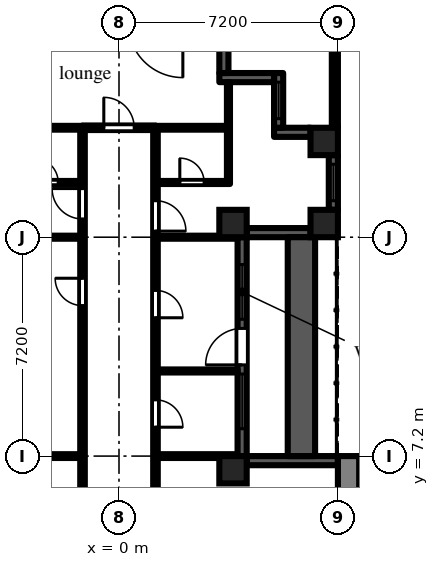
"""IFC4 building model, lengths in metres.
Left out: names, types, materials, properties, quantities, classifications, styles, units other than length and angle.
Written with IfcOpenShell. Run it as: python <this file> out.ifc"""

import sys

from ifc_helpers import new_model, si_unit, direction, frame, frame_2d, origin, origin_2d, place, context, subcontext, project, spatial, rectangle, extrude, element, fill, save


model = new_model("IFC4")
c1 = context("Model", 3, precision=1e-05, world=origin(), true_north=direction((0.0, 1.0)))
c2 = subcontext(c1, "Body", "Model", "MODEL_VIEW")
j1 = project(units=[si_unit("LENGTHUNIT", "METRE"), si_unit("PLANEANGLEUNIT", "RADIAN")], contexts=[c1])
p1 = place(None, origin())
s1 = spatial("IfcSite", under=j1, at=p1, CompositionType="ELEMENT")
p2 = place(p1, origin())
s2 = spatial("IfcBuilding", under=s1, at=p2, CompositionType="ELEMENT")
p3 = place(p2, frame((0.0, 0.0, 66.9)))
s3 = spatial("IfcBuildingStorey", under=s2, at=p3, CompositionType="ELEMENT", Elevation=66.9)
for number, where, z_axis, x_axis in (
    (1, (3.75, 6.75, 0.0), (0.0, 0.0, 1.0), (1.0, 0.0, 0.0)),
    (2, (3.75, 14.85, 0.0), (0.0, 0.0, 1.0), (1.0, 0.0, 0.0)),
    (3, (6.75, 14.85, 0.0), (0.0, 0.0, 1.0), (1.0, 0.0, 0.0)),
    (4, (6.75, 17.55, 0.0), (0.0, 0.0, 1.0), (1.0, 0.0, 0.0)),
):
    element("IfcColumn", number, at=place(p3, frame(where, z_axis=z_axis, x_axis=x_axis)), inside=s3, PredefinedType="COLUMN", context=c2, shape_type="SweptSolid", body=[
        extrude(rectangle(XDim=0.9, YDim=0.9, at=origin_2d()), origin(), (0.0, 0.0, 1.0), 3.0),
    ])
p4 = place(p3, frame((7.2, 7.05, 0.0), z_axis=(0.0, 0.0, 1.0), x_axis=(-1.0, 0.0, 0.0)))
e5 = element("IfcWall", 5, at=p4, inside=s3, PredefinedType="SOLIDWALL", context=c2, shape_type="SweptSolid", body=[
    extrude(rectangle(XDim=3.0, YDim=0.3, at=frame_2d((1.5, 0.0))), origin(), (0.0, 0.0, 1.0), 2.1),
])
p5 = place(p3, frame((4.05, 7.2, 0.0), z_axis=(0.0, 0.0, 1.0), x_axis=(0.0, 1.0, 0.0)))
e6 = element("IfcWall", 6, at=p5, inside=s3, PredefinedType="SOLIDWALL", context=c2, shape_type="SweptSolid", body=[
    extrude(rectangle(XDim=7.2, YDim=0.3, at=frame_2d((3.6, 0.0))), origin(), (0.0, 0.0, 1.0), 2.1),
])
p6 = place(p5, frame((3.0, 0.0, 0.0)))
e7 = element("IfcOpeningElement", 7, at=p6, cuts=e6, PredefinedType="OPENING", context=c2, shape_type="SweptSolid", body=[
    extrude(rectangle(XDim=1.2, YDim=2.05, at=frame_2d((0.6, 1.025))), frame((0.0, 0.16, 0.0), z_axis=(0.0, -1.0, 0.0), x_axis=(1.0, 0.0, 0.0)), (0.0, 0.0, 1.0), 0.32),
])
p7 = place(p5, frame((0.9, 0.0, 0.2)))
e8 = element("IfcOpeningElement", 8, at=p7, cuts=e6, PredefinedType="OPENING", context=c2, shape_type="SweptSolid", body=[
    extrude(rectangle(XDim=1.8, YDim=1.85, at=frame_2d((0.9, 0.925))), frame((0.0, 0.16, 0.0), z_axis=(0.0, -1.0, 0.0), x_axis=(1.0, 0.0, 0.0)), (0.0, 0.0, 1.0), 0.32),
])
p8 = place(p5, frame((4.5, 0.0, 0.2)))
e9 = element("IfcOpeningElement", 9, at=p8, cuts=e6, PredefinedType="OPENING", context=c2, shape_type="SweptSolid", body=[
    extrude(rectangle(XDim=1.8, YDim=1.85, at=frame_2d((0.9, 0.925))), frame((0.0, 0.16, 0.0), z_axis=(0.0, -1.0, 0.0), x_axis=(1.0, 0.0, 0.0)), (0.0, 0.0, 1.0), 0.32),
])
p9 = place(p3, frame((4.2, 14.55, 0.0), z_axis=(0.0, 0.0, 1.0), x_axis=(1.0, 0.0, 0.0)))
e10 = element("IfcWall", 10, at=p9, inside=s3, PredefinedType="SOLIDWALL", context=c2, shape_type="SweptSolid", body=[
    extrude(rectangle(XDim=2.1, YDim=0.3, at=frame_2d((1.05, 0.0))), origin(), (0.0, 0.0, 1.0), 2.1),
])
p10 = place(p3, frame((7.05, 15.3, 0.0), z_axis=(0.0, 0.0, 1.0), x_axis=(0.0, 1.0, 0.0)))
e11 = element("IfcWall", 11, at=p10, inside=s3, PredefinedType="SOLIDWALL", context=c2, shape_type="SweptSolid", body=[
    extrude(rectangle(XDim=1.8, YDim=0.3, at=frame_2d((0.9, 0.0))), origin(), (0.0, 0.0, 1.0), 2.1),
])
p11 = place(p10, frame((0.3, 0.0, 0.2)))
e12 = element("IfcOpeningElement", 12, at=p11, cuts=e11, PredefinedType="OPENING", context=c2, shape_type="SweptSolid", body=[
    extrude(rectangle(XDim=1.2, YDim=1.85, at=frame_2d((0.6, 0.925))), frame((0.0, 0.16, 0.0), z_axis=(0.0, -1.0, 0.0), x_axis=(1.0, 0.0, 0.0)), (0.0, 0.0, 1.0), 0.32),
])
p12 = place(p3, frame((6.3, 17.85, 0.0), z_axis=(0.0, 0.0, 1.0), x_axis=(-1.0, 0.0, 0.0)))
e13 = element("IfcWall", 13, at=p12, inside=s3, PredefinedType="SOLIDWALL", context=c2, shape_type="SweptSolid", body=[
    extrude(rectangle(XDim=1.2, YDim=0.3, at=frame_2d((0.6, 0.0))), origin(), (0.0, 0.0, 1.0), 2.575),
])
p13 = place(p3, frame((5.25, 18.0, 0.0), z_axis=(0.0, 0.0, 1.0), x_axis=(0.0, 1.0, 0.0)))
e14 = element("IfcWall", 14, at=p13, inside=s3, PredefinedType="SOLIDWALL", context=c2, shape_type="SweptSolid", body=[
    extrude(rectangle(XDim=1.8, YDim=0.3, at=frame_2d((0.9, 0.0))), origin(), (0.0, 0.0, 1.0), 2.575),
])
p14 = place(p13, frame((0.3, 0.0, 0.2)))
e15 = element("IfcOpeningElement", 15, at=p14, cuts=e14, PredefinedType="OPENING", context=c2, shape_type="SweptSolid", body=[
    extrude(rectangle(XDim=1.2, YDim=1.85, at=frame_2d((0.6, 0.925))), frame((0.0, 0.16, 0.0), z_axis=(0.0, -1.0, 0.0), x_axis=(1.0, 0.0, 0.0)), (0.0, 0.0, 1.0), 0.32),
])
p15 = place(p3, frame((5.1, 19.65, 0.0), z_axis=(0.0, 0.0, 1.0), x_axis=(-1.0, 0.0, 0.0)))
e16 = element("IfcWall", 16, at=p15, inside=s3, PredefinedType="SOLIDWALL", context=c2, shape_type="SweptSolid", body=[
    extrude(rectangle(XDim=1.8, YDim=0.3, at=frame_2d((0.9, 0.0))), origin(), (0.0, 0.0, 1.0), 2.575),
])
p16 = place(p3, frame((3.45, 19.8, 0.0), z_axis=(0.0, 0.0, 1.0), x_axis=(0.0, 1.0, 0.0)))
e17 = element("IfcWall", 17, at=p16, inside=s3, PredefinedType="SOLIDWALL", context=c2, shape_type="SweptSolid", body=[
    extrude(rectangle(XDim=0.9, YDim=0.3, at=frame_2d((0.45, 0.0))), origin(), (0.0, 0.0, 1.0), 2.575),
])
p17 = place(p3, frame((6.0, 7.2, 0.0), z_axis=(0.0, 0.0, 1.0), x_axis=(0.0, 1.0, 0.0)))
e18 = element("IfcWall", 18, at=p17, inside=s3, PredefinedType="PARAPET", context=c2, shape_type="SweptSolid", body=[
    extrude(rectangle(XDim=7.2, YDim=0.9, at=frame_2d((3.6, 0.0))), origin(), (0.0, 0.0, 1.0), 0.8),
])
p18 = place(p3, frame((7.1, 18.0, 0.0), z_axis=(0.0, 0.0, 1.0), x_axis=(0.0, 1.0, 0.0)))
e19 = element("IfcWall", 19, at=p18, inside=s3, PredefinedType="PARAPET", context=c2, shape_type="SweptSolid", body=[
    extrude(rectangle(XDim=21.4, YDim=0.2, at=frame_2d((10.7, 0.0))), origin(), (0.0, 0.0, 1.0), 1.1),
])
p19 = place(p3, frame((7.55, -7.2, 0.0), z_axis=(0.0, 0.0, 1.0), x_axis=(0.0, 1.0, 0.0)))
e20 = element("IfcWall", 20, at=p19, inside=s3, PredefinedType="SHEAR", context=c2, shape_type="SweptSolid", body=[
    extrude(rectangle(XDim=14.4, YDim=0.7, at=frame_2d((7.2, 0.0))), origin(), (0.0, 0.0, 1.0), 2.575),
])
p20 = place(p19, frame((6.0, 0.0, 0.0)))
e21 = element("IfcOpeningElement", 21, at=p20, cuts=e20, PredefinedType="OPENING", context=c2, shape_type="SweptSolid", body=[
    extrude(rectangle(XDim=2.4, YDim=2.2, at=frame_2d((1.2, 1.1))), frame((0.0, 0.36, 0.0), z_axis=(0.0, -1.0, 0.0), x_axis=(1.0, 0.0, 0.0)), (0.0, 0.0, 1.0), 0.72),
])
p21 = place(p3, frame((-3.9, 7.2, 0.0), z_axis=(0.0, 0.0, 1.0), x_axis=(1.0, 0.0, 0.0)))
e22 = element("IfcWall", 22, at=p21, inside=s3, PredefinedType="PARTITIONING", context=c2, shape_type="SweptSolid", body=[
    extrude(rectangle(XDim=2.625, YDim=0.125, at=frame_2d((1.312, 0.0))), origin(), (0.0, 0.0, 1.0), 2.575),
])
p22 = place(p3, frame((-3.9, 14.4, 0.0), z_axis=(0.0, 0.0, 1.0), x_axis=(1.0, 0.0, 0.0)))
e23 = element("IfcWall", 23, at=p22, inside=s3, PredefinedType="PARTITIONING", context=c2, shape_type="SweptSolid", body=[
    extrude(rectangle(XDim=2.625, YDim=0.1, at=frame_2d((1.312, 0.0))), origin(), (0.0, 0.0, 1.0), 2.575),
])
p23 = place(p3, frame((-3.55, 16.2, 0.0), z_axis=(0.0, 0.0, 1.0), x_axis=(1.0, 0.0, 0.0)))
e24 = element("IfcWall", 24, at=p23, inside=s3, PredefinedType="PARTITIONING", context=c2, shape_type="SweptSolid", body=[
    extrude(rectangle(XDim=2.275, YDim=0.1, at=frame_2d((1.138, 0.0))), origin(), (0.0, 0.0, 1.0), 2.575),
])
p24 = place(p23, frame((0.75, 0.0, 0.0)))
e25 = element("IfcOpeningElement", 25, at=p24, cuts=e24, PredefinedType="OPENING", context=c2, shape_type="SweptSolid", body=[
    extrude(rectangle(XDim=0.8, YDim=2.1, at=frame_2d((0.4, 1.05))), frame((0.0, 0.06, 0.0), z_axis=(0.0, -1.0, 0.0), x_axis=(1.0, 0.0, 0.0)), (0.0, 0.0, 1.0), 0.12),
])
p25 = place(p3, frame((-3.55, 18.0, 0.0), z_axis=(0.0, 0.0, 1.0), x_axis=(1.0, 0.0, 0.0)))
e26 = element("IfcWall", 26, at=p25, inside=s3, PredefinedType="PARTITIONING", context=c2, shape_type="SweptSolid", body=[
    extrude(rectangle(XDim=2.35, YDim=0.125, at=frame_2d((1.175, 0.0))), origin(), (0.0, 0.0, 1.0), 2.575),
])
p26 = place(p3, frame((-1.2, 1.275, 0.0), z_axis=(0.0, 0.0, 1.0), x_axis=(0.0, 1.0, 0.0)))
e27 = element("IfcWall", 27, at=p26, inside=s3, PredefinedType="PARTITIONING", context=c2, shape_type="SweptSolid", body=[
    extrude(rectangle(XDim=16.65, YDim=0.15, at=frame_2d((8.325, 0.0))), origin(), (0.0, 0.0, 1.0), 2.575),
])
p27 = place(p26, frame((0.675, 0.0, 0.0)))
e28 = element("IfcOpeningElement", 28, at=p27, cuts=e27, PredefinedType="OPENING", context=c2, shape_type="SweptSolid", body=[
    extrude(rectangle(XDim=0.9, YDim=2.1, at=frame_2d((0.45, 1.05))), frame((0.0, 0.085, 0.0), z_axis=(0.0, -1.0, 0.0), x_axis=(1.0, 0.0, 0.0)), (0.0, 0.0, 1.0), 0.17),
])
p28 = place(p26, frame((3.675, 0.0, 0.0)))
e29 = element("IfcOpeningElement", 29, at=p28, cuts=e27, PredefinedType="OPENING", context=c2, shape_type="SweptSolid", body=[
    extrude(rectangle(XDim=0.9, YDim=2.1, at=frame_2d((0.45, 1.05))), frame((0.0, 0.085, 0.0), z_axis=(0.0, -1.0, 0.0), x_axis=(1.0, 0.0, 0.0)), (0.0, 0.0, 1.0), 0.17),
])
p29 = place(p26, frame((10.875, 0.0, 0.0)))
e30 = element("IfcOpeningElement", 30, at=p29, cuts=e27, PredefinedType="OPENING", context=c2, shape_type="SweptSolid", body=[
    extrude(rectangle(XDim=0.9, YDim=2.1, at=frame_2d((0.45, 1.05))), frame((0.0, 0.085, 0.0), z_axis=(0.0, -1.0, 0.0), x_axis=(1.0, 0.0, 0.0)), (0.0, 0.0, 1.0), 0.17),
])
p30 = place(p26, frame((13.725, 0.0, 0.0)))
e31 = element("IfcOpeningElement", 31, at=p30, cuts=e27, PredefinedType="OPENING", context=c2, shape_type="SweptSolid", body=[
    extrude(rectangle(XDim=1.0, YDim=2.1, at=frame_2d((0.5, 1.05))), frame((0.0, 0.085, 0.0), z_axis=(0.0, -1.0, 0.0), x_axis=(1.0, 0.0, 0.0)), (0.0, 0.0, 1.0), 0.17),
])
p31 = place(p3, frame((-1.2, 18.0, 0.0), z_axis=(0.0, 0.0, 1.0), x_axis=(1.0, 0.0, 0.0)))
e32 = element("IfcWall", 32, at=p31, inside=s3, PredefinedType="PARTITIONING", context=c2, shape_type="SweptSolid", body=[
    extrude(rectangle(XDim=2.4, YDim=0.15, at=frame_2d((1.2, 0.0))), origin(), (0.0, 0.0, 1.0), 2.575),
])
p32 = place(p31, frame((0.7, 0.0, 0.0)))
e33 = element("IfcOpeningElement", 33, at=p32, cuts=e32, PredefinedType="OPENING", context=c2, shape_type="SweptSolid", body=[
    extrude(rectangle(XDim=1.0, YDim=2.1, at=frame_2d((0.5, 1.05))), frame((0.0, 0.085, 0.0), z_axis=(0.0, -1.0, 0.0), x_axis=(1.0, 0.0, 0.0)), (0.0, 0.0, 1.0), 0.17),
])
p33 = place(p3, frame((1.2, 1.125, 0.0), z_axis=(0.0, 0.0, 1.0), x_axis=(0.0, 1.0, 0.0)))
e34 = element("IfcWall", 34, at=p33, inside=s3, PredefinedType="PARTITIONING", context=c2, shape_type="SweptSolid", body=[
    extrude(rectangle(XDim=16.8, YDim=0.15, at=frame_2d((8.4, 0.0))), origin(), (0.0, 0.0, 1.0), 2.575),
])
p34 = place(p33, frame((7.025, 0.0, 0.0)))
e35 = element("IfcOpeningElement", 35, at=p34, cuts=e34, PredefinedType="OPENING", context=c2, shape_type="SweptSolid", body=[
    extrude(rectangle(XDim=0.9, YDim=2.1, at=frame_2d((0.45, 1.05))), frame((0.0, 0.085, 0.0), z_axis=(0.0, -1.0, 0.0), x_axis=(1.0, 0.0, 0.0)), (0.0, 0.0, 1.0), 0.17),
])
p35 = place(p33, frame((10.625, 0.0, 0.0)))
e36 = element("IfcOpeningElement", 36, at=p35, cuts=e34, PredefinedType="OPENING", context=c2, shape_type="SweptSolid", body=[
    extrude(rectangle(XDim=0.9, YDim=2.1, at=frame_2d((0.45, 1.05))), frame((0.0, 0.085, 0.0), z_axis=(0.0, -1.0, 0.0), x_axis=(1.0, 0.0, 0.0)), (0.0, 0.0, 1.0), 0.17),
])
p36 = place(p33, frame((13.475, 0.0, 0.0)))
e37 = element("IfcOpeningElement", 37, at=p36, cuts=e34, PredefinedType="OPENING", context=c2, shape_type="SweptSolid", body=[
    extrude(rectangle(XDim=1.0, YDim=2.1, at=frame_2d((0.5, 1.05))), frame((0.0, 0.085, 0.0), z_axis=(0.0, -1.0, 0.0), x_axis=(1.0, 0.0, 0.0)), (0.0, 0.0, 1.0), 0.17),
])
p37 = place(p3, frame((1.275, 7.2, 0.0), z_axis=(0.0, 0.0, 1.0), x_axis=(1.0, 0.0, 0.0)))
e38 = element("IfcWall", 38, at=p37, inside=s3, PredefinedType="PARTITIONING", context=c2, shape_type="SweptSolid", body=[
    extrude(rectangle(XDim=2.625, YDim=0.125, at=frame_2d((1.312, 0.0))), origin(), (0.0, 0.0, 1.0), 2.575),
])
for number, where, z_axis, x_axis in (
    (39, (1.275, 10.0, 0.0), (0.0, 0.0, 1.0), (1.0, 0.0, 0.0)),
    (40, (1.275, 14.4, 0.0), (0.0, 0.0, 1.0), (1.0, 0.0, 0.0)),
):
    element("IfcWall", number, at=place(p3, frame(where, z_axis=z_axis, x_axis=x_axis)), inside=s3, PredefinedType="PARTITIONING", context=c2, shape_type="SweptSolid", body=[
        extrude(rectangle(XDim=2.625, YDim=0.1, at=frame_2d((1.312, 0.0))), origin(), (0.0, 0.0, 1.0), 2.575),
    ])
p38 = place(p3, frame((1.275, 16.2, 0.0), z_axis=(0.0, 0.0, 1.0), x_axis=(1.0, 0.0, 0.0)))
e41 = element("IfcWall", 41, at=p38, inside=s3, PredefinedType="PARTITIONING", context=c2, shape_type="SweptSolid", body=[
    extrude(rectangle(XDim=2.375, YDim=0.1, at=frame_2d((1.188, 0.0))), origin(), (0.0, 0.0, 1.0), 2.575),
])
p39 = place(p38, frame((0.725, 0.0, 0.0)))
e42 = element("IfcOpeningElement", 42, at=p39, cuts=e41, PredefinedType="OPENING", context=c2, shape_type="SweptSolid", body=[
    extrude(rectangle(XDim=0.8, YDim=2.1, at=frame_2d((0.4, 1.05))), frame((0.0, 0.06, 0.0), z_axis=(0.0, -1.0, 0.0), x_axis=(1.0, 0.0, 0.0)), (0.0, 0.0, 1.0), 0.12),
])
p40 = place(p3, frame((1.2, 18.0, 0.0), z_axis=(0.0, 0.0, 1.0), x_axis=(1.0, 0.0, 0.0)))
e43 = element("IfcWall", 43, at=p40, inside=s3, PredefinedType="PARTITIONING", context=c2, shape_type="SweptSolid", body=[
    extrude(rectangle(XDim=2.35, YDim=0.125, at=frame_2d((1.175, 0.0))), origin(), (0.0, 0.0, 1.0), 2.575),
])
p41 = place(p3, frame((3.6, 16.25, 0.0), z_axis=(0.0, 0.0, 1.0), x_axis=(0.0, 1.0, 0.0)))
e44 = element("IfcWall", 44, at=p41, inside=s3, PredefinedType="PARTITIONING", context=c2, shape_type="SweptSolid", body=[
    extrude(rectangle(XDim=3.25, YDim=0.1, at=frame_2d((1.625, 0.0))), origin(), (0.0, 0.0, 1.0), 2.575),
])
p42 = place(p6, origin())
e45 = element("IfcDoor", 45, at=p42, inside=s3, OperationType="SINGLE_SWING_LEFT", PredefinedType="DOOR", context=c2, shape_type="SweptSolid", body=[
    extrude(rectangle(XDim=1.2, YDim=2.05, at=frame_2d((0.6, 1.025))), frame((0.0, 0.025, 0.0), z_axis=(0.0, -1.0, 0.0), x_axis=(1.0, 0.0, 0.0)), (0.0, 0.0, 1.0), 0.05),
])
fill(e7, e45)
p43 = place(p7, origin())
e46 = element("IfcWindow", 46, at=p43, inside=s3, PartitioningType="SINGLE_PANEL", PredefinedType="WINDOW", context=c2, shape_type="SweptSolid", body=[
    extrude(rectangle(XDim=1.8, YDim=1.85, at=frame_2d((0.9, 0.925))), frame((0.0, 0.03, 0.0), z_axis=(0.0, -1.0, 0.0), x_axis=(1.0, 0.0, 0.0)), (0.0, 0.0, 1.0), 0.06),
])
fill(e8, e46)
p44 = place(p8, origin())
e47 = element("IfcWindow", 47, at=p44, inside=s3, PartitioningType="SINGLE_PANEL", PredefinedType="WINDOW", context=c2, shape_type="SweptSolid", body=[
    extrude(rectangle(XDim=1.8, YDim=1.85, at=frame_2d((0.9, 0.925))), frame((0.0, 0.03, 0.0), z_axis=(0.0, -1.0, 0.0), x_axis=(1.0, 0.0, 0.0)), (0.0, 0.0, 1.0), 0.06),
])
fill(e9, e47)
p45 = place(p11, origin())
e48 = element("IfcWindow", 48, at=p45, inside=s3, PartitioningType="SINGLE_PANEL", PredefinedType="WINDOW", context=c2, shape_type="SweptSolid", body=[
    extrude(rectangle(XDim=1.2, YDim=1.85, at=frame_2d((0.6, 0.925))), frame((0.0, 0.03, 0.0), z_axis=(0.0, -1.0, 0.0), x_axis=(1.0, 0.0, 0.0)), (0.0, 0.0, 1.0), 0.06),
])
fill(e12, e48)
p46 = place(p14, origin())
e49 = element("IfcWindow", 49, at=p46, inside=s3, PartitioningType="SINGLE_PANEL", PredefinedType="WINDOW", context=c2, shape_type="SweptSolid", body=[
    extrude(rectangle(XDim=1.2, YDim=1.85, at=frame_2d((0.6, 0.925))), frame((0.0, 0.03, 0.0), z_axis=(0.0, -1.0, 0.0), x_axis=(1.0, 0.0, 0.0)), (0.0, 0.0, 1.0), 0.06),
])
fill(e15, e49)
p47 = place(p32, origin())
e50 = element("IfcDoor", 50, at=p47, inside=s3, OperationType="SINGLE_SWING_LEFT", PredefinedType="DOOR", context=c2, shape_type="SweptSolid", body=[
    extrude(rectangle(XDim=1.0, YDim=2.1, at=frame_2d((0.5, 1.05))), frame((0.0, 0.025, 0.0), z_axis=(0.0, -1.0, 0.0), x_axis=(1.0, 0.0, 0.0)), (0.0, 0.0, 1.0), 0.05),
])
fill(e33, e50)
p48 = place(p29, origin())
e51 = element("IfcDoor", 51, at=p48, inside=s3, OperationType="SINGLE_SWING_RIGHT", PredefinedType="DOOR", context=c2, shape_type="SweptSolid", body=[
    extrude(rectangle(XDim=0.9, YDim=2.1, at=frame_2d((0.45, 1.05))), frame((0.0, 0.025, 0.0), z_axis=(0.0, -1.0, 0.0), x_axis=(1.0, 0.0, 0.0)), (0.0, 0.0, 1.0), 0.05),
])
fill(e30, e51)
p49 = place(p24, origin())
e52 = element("IfcDoor", 52, at=p49, inside=s3, OperationType="SINGLE_SWING_LEFT", PredefinedType="DOOR", context=c2, shape_type="SweptSolid", body=[
    extrude(rectangle(XDim=0.8, YDim=2.1, at=frame_2d((0.4, 1.05))), frame((0.0, 0.025, 0.0), z_axis=(0.0, -1.0, 0.0), x_axis=(1.0, 0.0, 0.0)), (0.0, 0.0, 1.0), 0.05),
])
fill(e25, e52)
p50 = place(p30, origin())
e53 = element("IfcDoor", 53, at=p50, inside=s3, OperationType="SINGLE_SWING_RIGHT", PredefinedType="DOOR", context=c2, shape_type="SweptSolid", body=[
    extrude(rectangle(XDim=1.0, YDim=2.1, at=frame_2d((0.5, 1.05))), frame((0.0, 0.025, 0.0), z_axis=(0.0, -1.0, 0.0), x_axis=(1.0, 0.0, 0.0)), (0.0, 0.0, 1.0), 0.05),
])
fill(e31, e53)
p51 = place(p34, frame((0.9, 0.0, 0.0), z_axis=(0.0, 0.0, 1.0), x_axis=(-1.0, 0.0, 0.0)))
e54 = element("IfcDoor", 54, at=p51, inside=s3, OperationType="SINGLE_SWING_RIGHT", PredefinedType="DOOR", context=c2, shape_type="SweptSolid", body=[
    extrude(rectangle(XDim=0.9, YDim=2.1, at=frame_2d((0.45, 1.05))), frame((0.0, 0.025, 0.0), z_axis=(0.0, -1.0, 0.0), x_axis=(1.0, 0.0, 0.0)), (0.0, 0.0, 1.0), 0.05),
])
fill(e35, e54)
p52 = place(p35, frame((0.9, 0.0, 0.0), z_axis=(0.0, 0.0, 1.0), x_axis=(-1.0, 0.0, 0.0)))
e55 = element("IfcDoor", 55, at=p52, inside=s3, OperationType="SINGLE_SWING_RIGHT", PredefinedType="DOOR", context=c2, shape_type="SweptSolid", body=[
    extrude(rectangle(XDim=0.9, YDim=2.1, at=frame_2d((0.45, 1.05))), frame((0.0, 0.025, 0.0), z_axis=(0.0, -1.0, 0.0), x_axis=(1.0, 0.0, 0.0)), (0.0, 0.0, 1.0), 0.05),
])
fill(e36, e55)
p53 = place(p39, origin())
e56 = element("IfcDoor", 56, at=p53, inside=s3, OperationType="SINGLE_SWING_LEFT", PredefinedType="DOOR", context=c2, shape_type="SweptSolid", body=[
    extrude(rectangle(XDim=0.8, YDim=2.1, at=frame_2d((0.4, 1.05))), frame((0.0, 0.025, 0.0), z_axis=(0.0, -1.0, 0.0), x_axis=(1.0, 0.0, 0.0)), (0.0, 0.0, 1.0), 0.05),
])
fill(e42, e56)
p54 = place(p36, frame((1.0, 0.0, 0.0), z_axis=(0.0, 0.0, 1.0), x_axis=(-1.0, 0.0, 0.0)))
e57 = element("IfcDoor", 57, at=p54, inside=s3, OperationType="SINGLE_SWING_RIGHT", PredefinedType="DOOR", context=c2, shape_type="SweptSolid", body=[
    extrude(rectangle(XDim=1.0, YDim=2.1, at=frame_2d((0.5, 1.05))), frame((0.0, 0.025, 0.0), z_axis=(0.0, -1.0, 0.0), x_axis=(1.0, 0.0, 0.0)), (0.0, 0.0, 1.0), 0.05),
])
fill(e37, e57)
save(model, sys.argv[1])
